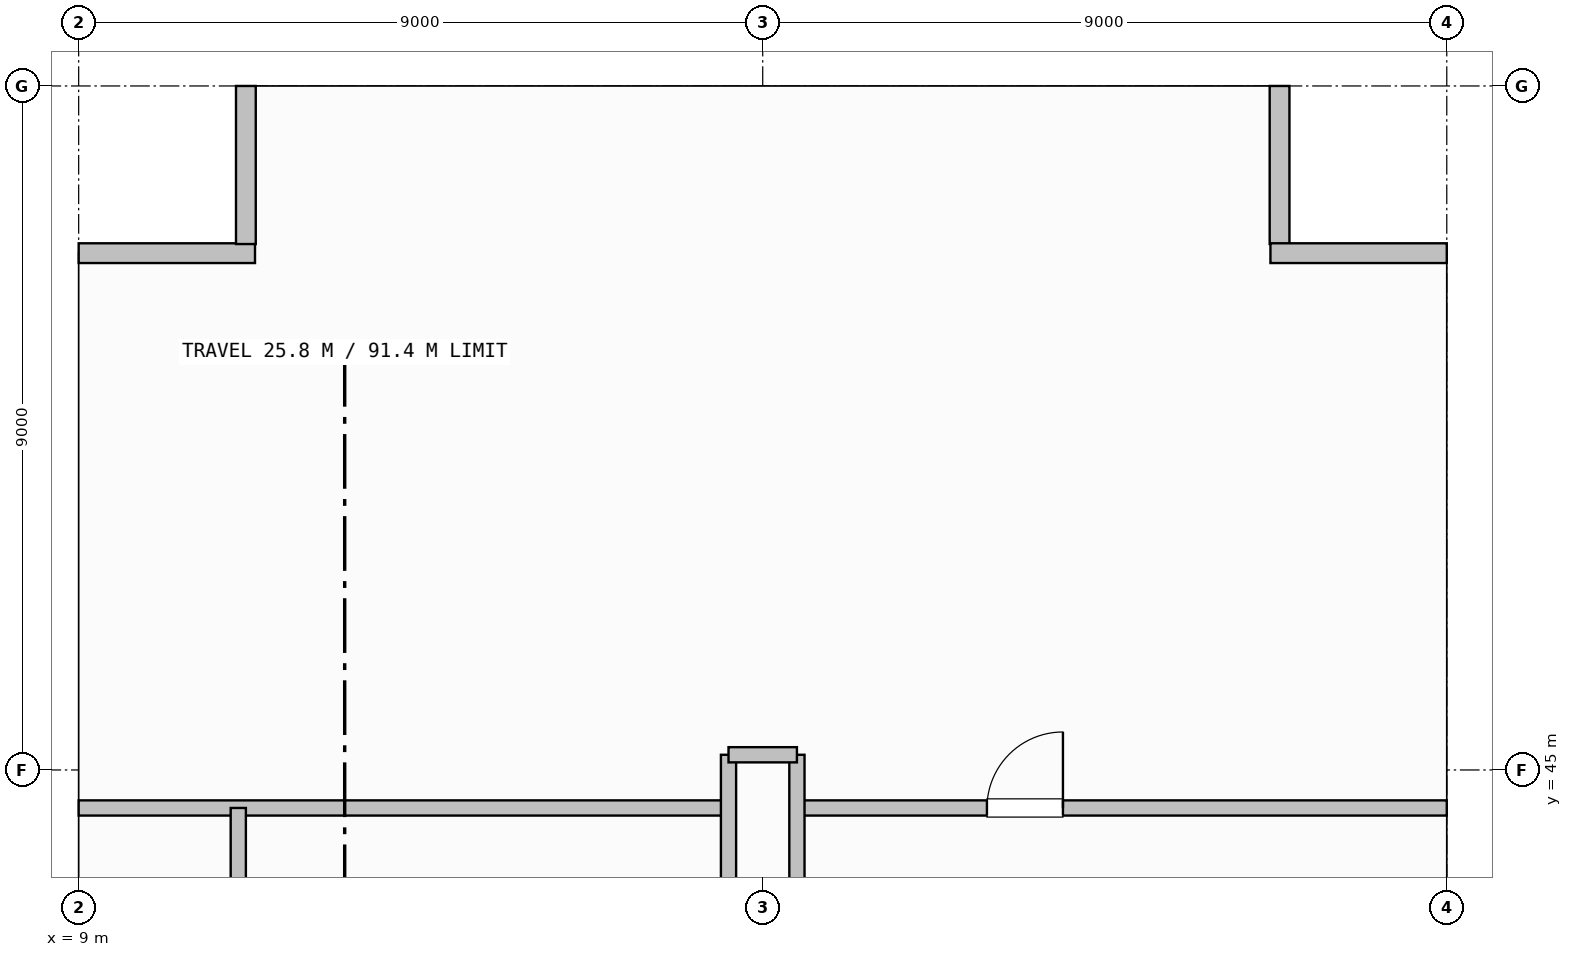
"""IFC4 building model, lengths in metres.
Left out: names, types, materials, properties, quantities, classifications, styles, units other than length and angle.
Written with IfcOpenShell. Run it as: python <this file> out.ifc"""

import sys

from ifc_helpers import new_model, si_unit, direction, frame, frame_2d, origin, origin_2d, place, context, subcontext, project, spatial, rectangle, i_section, extrude, element, fill, save


model = new_model("IFC4")
c1 = context("Model", 3, precision=1e-05, world=origin(), true_north=direction((0.0, 1.0)))
c2 = subcontext(c1, "Body", "Model", "MODEL_VIEW")
j1 = project(units=[si_unit("LENGTHUNIT", "METRE"), si_unit("PLANEANGLEUNIT", "RADIAN")], contexts=[c1])
p1 = place(None, origin())
s1 = spatial("IfcSite", under=j1, at=p1, CompositionType="ELEMENT")
p2 = place(p1, origin())
s2 = spatial("IfcBuilding", under=s1, at=p2, CompositionType="ELEMENT")
p3 = place(p2, frame((0.0, 0.0, 100.2)))
s3 = spatial("IfcBuildingStorey", under=s2, at=p3, CompositionType="ELEMENT", Elevation=100.2)
for number, where, z_axis, x_axis in (
    (1, (9.0, 45.0, 0.0), (0.0, 0.0, 1.0), (1.0, 0.0, 0.0)),
    (2, (18.0, 45.0, 0.0), (0.0, 0.0, 1.0), (1.0, 0.0, 0.0)),
    (3, (18.0, 54.0, 0.0), (0.0, 0.0, 1.0), (1.0, 0.0, 0.0)),
    (4, (27.0, 45.0, 0.0), (0.0, 0.0, 1.0), (1.0, 0.0, 0.0)),
):
    element("IfcColumn", number, at=place(p3, frame(where, z_axis=z_axis, x_axis=x_axis)), inside=s3, PredefinedType="COLUMN", context=c2, shape_type="SweptSolid", body=[
        extrude(i_section(OverallWidth=0.424, OverallDepth=0.474, WebThickness=0.048, FlangeThickness=0.077, FilletRadius=0.015, at=origin_2d()), origin(), (0.0, 0.0, 1.0), 4.8),
    ])
p4 = place(p3, frame((9.0, 51.8, 0.0), z_axis=(0.0, 0.0, 1.0), x_axis=(1.0, 0.0, 0.0)))
e5 = element("IfcWall", 5, at=p4, inside=s3, PredefinedType="SOLIDWALL", context=c2, shape_type="SweptSolid", body=[
    extrude(rectangle(XDim=2.32, YDim=0.26, at=frame_2d((1.16, 0.0))), origin(), (0.0, 0.0, 1.0), 4.47),
])
for number, where, z_axis, x_axis in (
    (6, (11.2, 51.92, 0.0), (0.0, 0.0, 1.0), (0.0, 1.0, 0.0)),
    (7, (24.8, 54.0, 0.0), (0.0, 0.0, 1.0), (0.0, -1.0, 0.0)),
):
    element("IfcWall", number, at=place(p3, frame(where, z_axis=z_axis, x_axis=x_axis)), inside=s3, PredefinedType="SOLIDWALL", context=c2, shape_type="SweptSolid", body=[
        extrude(rectangle(XDim=2.08, YDim=0.26, at=frame_2d((1.04, 0.0))), origin(), (0.0, 0.0, 1.0), 4.47),
    ])
p5 = place(p3, frame((24.68, 51.8, 0.0), z_axis=(0.0, 0.0, 1.0), x_axis=(1.0, 0.0, 0.0)))
e8 = element("IfcWall", 8, at=p5, inside=s3, PredefinedType="SOLIDWALL", context=c2, shape_type="SweptSolid", body=[
    extrude(rectangle(XDim=2.32, YDim=0.26, at=frame_2d((1.16, 0.0))), origin(), (0.0, 0.0, 1.0), 4.47),
])
p6 = place(p3, frame((9.0, 44.5, 0.0), z_axis=(0.0, 0.0, 1.0), x_axis=(1.0, 0.0, 0.0)))
e9 = element("IfcWall", 9, at=p6, inside=s3, PredefinedType="PARTITIONING", context=c2, shape_type="SweptSolid", body=[
    extrude(rectangle(XDim=8.55, YDim=0.2, at=frame_2d((4.275, 0.0))), origin(), (0.0, 0.0, 1.0), 3.677),
])
p7 = place(p3, frame((18.45, 44.5, 0.0), z_axis=(0.0, 0.0, 1.0), x_axis=(1.0, 0.0, 0.0)))
e10 = element("IfcWall", 10, at=p7, inside=s3, PredefinedType="PARTITIONING", context=c2, shape_type="SweptSolid", body=[
    extrude(rectangle(XDim=8.55, YDim=0.2, at=frame_2d((4.275, 0.0))), origin(), (0.0, 0.0, 1.0), 3.677),
])
p8 = place(p7, frame((2.5, 0.0, 0.0)))
e11 = element("IfcOpeningElement", 11, at=p8, cuts=e10, PredefinedType="OPENING", context=c2, shape_type="SweptSolid", body=[
    extrude(rectangle(XDim=1.0, YDim=2.15, at=frame_2d((0.5, 1.075))), frame((0.0, 0.11, 0.0), z_axis=(0.0, -1.0, 0.0), x_axis=(1.0, 0.0, 0.0)), (0.0, 0.0, 1.0), 0.22),
])
for number, where, z_axis, x_axis in (
    (12, (17.55, 42.4, 0.0), (0.0, 0.0, 1.0), (0.0, 1.0, 0.0)),
    (13, (18.45, 42.4, 0.0), (0.0, 0.0, 1.0), (0.0, 1.0, 0.0)),
):
    element("IfcWall", number, at=place(p3, frame(where, z_axis=z_axis, x_axis=x_axis)), inside=s3, PredefinedType="PARTITIONING", context=c2, shape_type="SweptSolid", body=[
        extrude(rectangle(XDim=2.8, YDim=0.2, at=frame_2d((1.4, 0.0))), origin(), (0.0, 0.0, 1.0), 3.839),
    ])
p9 = place(p3, frame((17.55, 45.2, 0.0), z_axis=(0.0, 0.0, 1.0), x_axis=(1.0, 0.0, 0.0)))
e14 = element("IfcWall", 14, at=p9, inside=s3, PredefinedType="PARTITIONING", context=c2, shape_type="SweptSolid", body=[
    extrude(rectangle(XDim=0.9, YDim=0.2, at=frame_2d((0.45, 0.0))), origin(), (0.0, 0.0, 1.0), 3.839),
])
p10 = place(p3, frame((11.1, 42.4, 0.0), z_axis=(0.0, 0.0, 1.0), x_axis=(0.0, 1.0, 0.0)))
e15 = element("IfcWall", 15, at=p10, inside=s3, PredefinedType="PARTITIONING", context=c2, shape_type="SweptSolid", body=[
    extrude(rectangle(XDim=2.1, YDim=0.2, at=frame_2d((1.05, 0.0))), origin(), (0.0, 0.0, 1.0), 4.47),
])
p11 = place(p8, origin())
e16 = element("IfcDoor", 16, at=p11, inside=s3, OperationType="SINGLE_SWING_RIGHT", PredefinedType="DOOR", context=c2, shape_type="SweptSolid", body=[
    extrude(rectangle(XDim=1.0, YDim=2.15, at=frame_2d((0.5, 1.075))), frame((0.0, 0.025, 0.0), z_axis=(0.0, -1.0, 0.0), x_axis=(1.0, 0.0, 0.0)), (0.0, 0.0, 1.0), 0.05),
])
fill(e11, e16)
save(model, sys.argv[1])
